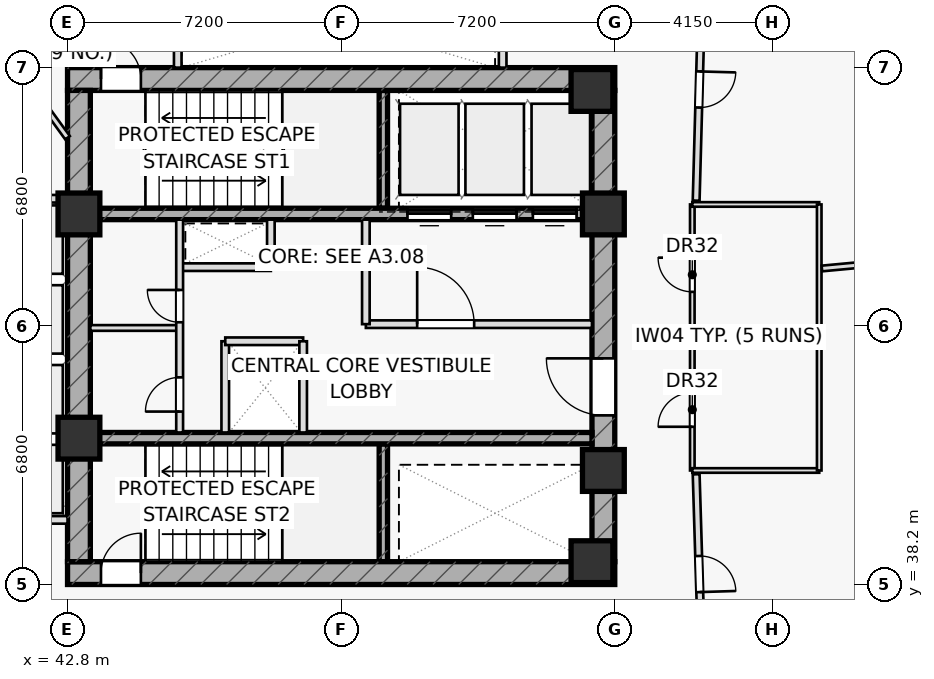
"""IFC4 building model, lengths in metres.
Left out: names, types, materials, properties, quantities, classifications, styles, units other than length and angle.
Written with IfcOpenShell. Run it as: python <this file> out.ifc"""

import sys

from ifc_helpers import new_model, si_unit, direction, frame, frame_2d, origin, origin_2d, place, context, subcontext, project, spatial, rectangle, extrude, element, fill, save


model = new_model("IFC4")
c1 = context("Model", 3, precision=1e-05, world=origin(), true_north=direction((0.0, 1.0)))
c2 = subcontext(c1, "Body", "Model", "MODEL_VIEW")
j1 = project(units=[si_unit("LENGTHUNIT", "METRE"), si_unit("PLANEANGLEUNIT", "RADIAN")], contexts=[c1])
p1 = place(None, origin())
s1 = spatial("IfcSite", under=j1, at=p1, CompositionType="ELEMENT")
p2 = place(p1, origin())
s2 = spatial("IfcBuilding", under=s1, at=p2, CompositionType="ELEMENT")
p3 = place(p2, frame((0.0, 0.0, 66.6)))
s3 = spatial("IfcBuildingStorey", under=s2, at=p3, CompositionType="ELEMENT", Elevation=66.6)
for number, where, z_axis, x_axis in (
    (1, (51.11, 48.1, 0.0), (0.0, 0.0, 1.0), (0.0, 1.0, 0.0)),
    (2, (51.11, 38.8, 0.0), (0.0, 0.0, 1.0), (0.0, 1.0, 0.0)),
):
    element("IfcWall", number, at=place(p3, frame(where, z_axis=z_axis, x_axis=x_axis)), inside=s3, PredefinedType="SHEAR", context=c2, shape_type="SweptSolid", body=[
        extrude(rectangle(XDim=3.1, YDim=0.22, at=frame_2d((1.55, 0.0))), origin(), (0.0, 0.0, 1.0), 3.6),
    ])
p4 = place(p3, frame((42.8, 51.5, 0.0), z_axis=(0.0, 0.0, 1.0), x_axis=(1.0, 0.0, 0.0)))
e3 = element("IfcWall", 3, at=p4, inside=s3, PredefinedType="SHEAR", context=c2, shape_type="SweptSolid", body=[
    extrude(rectangle(XDim=14.4, YDim=0.6, at=frame_2d((7.2, 0.0))), origin(), (0.0, 0.0, 1.0), 3.6),
])
p5 = place(p4, frame((0.88, 0.0, 0.0)))
e4 = element("IfcOpeningElement", 4, at=p5, cuts=e3, PredefinedType="OPENING", context=c2, shape_type="SweptSolid", body=[
    extrude(rectangle(XDim=1.05, YDim=2.2, at=frame_2d((0.525, 1.1))), frame((0.0, 0.31, 0.0), z_axis=(0.0, -1.0, 0.0), x_axis=(1.0, 0.0, 0.0)), (0.0, 0.0, 1.0), 0.62),
])
p6 = place(p3, frame((42.8, 38.5, 0.0), z_axis=(0.0, 0.0, 1.0), x_axis=(1.0, 0.0, 0.0)))
e5 = element("IfcWall", 5, at=p6, inside=s3, PredefinedType="SHEAR", context=c2, shape_type="SweptSolid", body=[
    extrude(rectangle(XDim=14.4, YDim=0.6, at=frame_2d((7.2, 0.0))), origin(), (0.0, 0.0, 1.0), 3.6),
])
p7 = place(p6, frame((0.88, 0.0, 0.0)))
e6 = element("IfcOpeningElement", 6, at=p7, cuts=e5, PredefinedType="OPENING", context=c2, shape_type="SweptSolid", body=[
    extrude(rectangle(XDim=1.05, YDim=2.2, at=frame_2d((0.525, 1.1))), frame((0.0, 0.31, 0.0), z_axis=(0.0, -1.0, 0.0), x_axis=(1.0, 0.0, 0.0)), (0.0, 0.0, 1.0), 0.62),
])
p8 = place(p3, frame((43.1, 38.8, 0.0), z_axis=(0.0, 0.0, 1.0), x_axis=(0.0, 1.0, 0.0)))
e7 = element("IfcWall", 7, at=p8, inside=s3, PredefinedType="SHEAR", context=c2, shape_type="SweptSolid", body=[
    extrude(rectangle(XDim=12.4, YDim=0.6, at=frame_2d((6.2, 0.0))), origin(), (0.0, 0.0, 1.0), 3.6),
])
p9 = place(p3, frame((56.9, 38.8, 0.0), z_axis=(0.0, 0.0, 1.0), x_axis=(0.0, 1.0, 0.0)))
e8 = element("IfcWall", 8, at=p9, inside=s3, PredefinedType="SHEAR", context=c2, shape_type="SweptSolid", body=[
    extrude(rectangle(XDim=12.4, YDim=0.6, at=frame_2d((6.2, 0.0))), origin(), (0.0, 0.0, 1.0), 3.6),
])
p10 = place(p9, frame((3.85, 0.0, 0.0)))
e9 = element("IfcOpeningElement", 9, at=p10, cuts=e8, PredefinedType="OPENING", context=c2, shape_type="SweptSolid", body=[
    extrude(rectangle(XDim=1.5, YDim=2.2, at=frame_2d((0.75, 1.1))), frame((0.0, 0.31, 0.0), z_axis=(0.0, -1.0, 0.0), x_axis=(1.0, 0.0, 0.0)), (0.0, 0.0, 1.0), 0.62),
])
p11 = place(p3, frame((43.4, 47.95, 0.0), z_axis=(0.0, 0.0, 1.0), x_axis=(1.0, 0.0, 0.0)))
e10 = element("IfcWall", 10, at=p11, inside=s3, PredefinedType="SHEAR", context=c2, shape_type="SweptSolid", body=[
    extrude(rectangle(XDim=13.2, YDim=0.3, at=frame_2d((6.6, 0.0))), origin(), (0.0, 0.0, 1.0), 3.6),
])
p12 = place(p11, frame((8.345, 0.0, 0.0)))
e11 = element("IfcOpeningElement", 11, at=p12, cuts=e10, PredefinedType="OPENING", context=c2, shape_type="SweptSolid", body=[
    extrude(rectangle(XDim=1.15, YDim=2.2, at=frame_2d((0.575, 1.1))), frame((0.0, 0.16, 0.0), z_axis=(0.0, -1.0, 0.0), x_axis=(1.0, 0.0, 0.0)), (0.0, 0.0, 1.0), 0.32),
])
p13 = place(p11, frame((10.065, 0.0, 0.0)))
e12 = element("IfcOpeningElement", 12, at=p13, cuts=e10, PredefinedType="OPENING", context=c2, shape_type="SweptSolid", body=[
    extrude(rectangle(XDim=1.15, YDim=2.2, at=frame_2d((0.575, 1.1))), frame((0.0, 0.16, 0.0), z_axis=(0.0, -1.0, 0.0), x_axis=(1.0, 0.0, 0.0)), (0.0, 0.0, 1.0), 0.32),
])
p14 = place(p11, frame((11.645, 0.0, 0.0)))
e13 = element("IfcOpeningElement", 13, at=p14, cuts=e10, PredefinedType="OPENING", context=c2, shape_type="SweptSolid", body=[
    extrude(rectangle(XDim=1.15, YDim=2.2, at=frame_2d((0.575, 1.1))), frame((0.0, 0.16, 0.0), z_axis=(0.0, -1.0, 0.0), x_axis=(1.0, 0.0, 0.0)), (0.0, 0.0, 1.0), 0.32),
])
p15 = place(p3, frame((43.4, 42.05, 0.0), z_axis=(0.0, 0.0, 1.0), x_axis=(1.0, 0.0, 0.0)))
e14 = element("IfcWall", 14, at=p15, inside=s3, PredefinedType="SHEAR", context=c2, shape_type="SweptSolid", body=[
    extrude(rectangle(XDim=13.2, YDim=0.3, at=frame_2d((6.6, 0.0))), origin(), (0.0, 0.0, 1.0), 3.6),
])
for number, where, z_axis, x_axis in (
    (15, (43.1, 47.95, 0.0), (0.0, 0.0, 1.0), (1.0, 0.0, 0.0)),
    (16, (56.9, 47.95, 0.0), (0.0, 0.0, 1.0), (1.0, 0.0, 0.0)),
    (17, (56.6, 51.2, 0.0), (0.0, 0.0, 1.0), (1.0, 0.0, 0.0)),
    (18, (43.1, 42.05, 0.0), (0.0, 0.0, 1.0), (1.0, 0.0, 0.0)),
    (19, (56.9, 41.2, 0.0), (0.0, 0.0, 1.0), (1.0, 0.0, 0.0)),
    (20, (56.6, 38.8, 0.0), (0.0, 0.0, 1.0), (1.0, 0.0, 0.0)),
):
    element("IfcColumn", number, at=place(p3, frame(where, z_axis=z_axis, x_axis=x_axis)), inside=s3, PredefinedType="COLUMN", context=c2, shape_type="SweptSolid", body=[
        extrude(rectangle(XDim=1.1, YDim=1.1, at=origin_2d()), origin(), (0.0, 0.0, 1.0), 3.6),
    ])
for number, where, z_axis, x_axis in (
    (21, (40.3, 39.9, 0.0), (0.0, 0.0, 1.0), (1.0, 0.0, 0.0)),
    (22, (40.3, 48.35, 0.0), (0.0, 0.0, 1.0), (1.0, 0.0, 0.0)),
    (23, (45.7, 51.8, 0.0), (0.0, 0.0, 1.0), (0.0, 1.0, 0.0)),
    (24, (54.25, 51.8, 0.0), (0.0, 0.0, 1.0), (0.0, 1.0, 0.0)),
):
    element("IfcWall", number, at=place(p3, frame(where, z_axis=z_axis, x_axis=x_axis)), inside=s3, PredefinedType="PARTITIONING", context=c2, shape_type="SweptSolid", body=[
        extrude(rectangle(XDim=2.5, YDim=0.2, at=frame_2d((1.25, 0.0))), origin(), (0.0, 0.0, 1.0), 3.6),
    ])
p16 = place(p3, frame((45.75, 46.55, 0.0), z_axis=(0.0, 0.0, 1.0), x_axis=(1.0, 0.0, 0.0)))
e25 = element("IfcWall", 25, at=p16, inside=s3, PredefinedType="PARTITIONING", context=c2, shape_type="SweptSolid", body=[
    extrude(rectangle(XDim=2.4, YDim=0.2, at=frame_2d((1.2, 0.0))), origin(), (0.0, 0.0, 1.0), 3.6),
])
p17 = place(p3, frame((48.15, 46.55, 0.0), z_axis=(0.0, 0.0, 1.0), x_axis=(0.0, 1.0, 0.0)))
e26 = element("IfcWall", 26, at=p17, inside=s3, PredefinedType="PARTITIONING", context=c2, shape_type="SweptSolid", body=[
    extrude(rectangle(XDim=1.25, YDim=0.2, at=frame_2d((0.625, 0.0))), origin(), (0.0, 0.0, 1.0), 3.6),
])
p18 = place(p3, frame((46.95, 42.2, 0.0), z_axis=(0.0, 0.0, 1.0), x_axis=(0.0, 1.0, 0.0)))
e27 = element("IfcWall", 27, at=p18, inside=s3, PredefinedType="PARTITIONING", context=c2, shape_type="SweptSolid", body=[
    extrude(rectangle(XDim=2.4, YDim=0.2, at=frame_2d((1.2, 0.0))), origin(), (0.0, 0.0, 1.0), 3.6),
])
p19 = place(p3, frame((46.95, 44.6, 0.0), z_axis=(0.0, 0.0, 1.0), x_axis=(1.0, 0.0, 0.0)))
e28 = element("IfcWall", 28, at=p19, inside=s3, PredefinedType="PARTITIONING", context=c2, shape_type="SweptSolid", body=[
    extrude(rectangle(XDim=2.05, YDim=0.2, at=frame_2d((1.025, 0.0))), origin(), (0.0, 0.0, 1.0), 3.6),
])
p20 = place(p3, frame((50.65, 45.05, 0.0), z_axis=(0.0, 0.0, 1.0), x_axis=(1.0, 0.0, 0.0)))
e29 = element("IfcWall", 29, at=p20, inside=s3, PredefinedType="PARTITIONING", context=c2, shape_type="SweptSolid", body=[
    extrude(rectangle(XDim=5.95, YDim=0.2, at=frame_2d((2.975, 0.0))), origin(), (0.0, 0.0, 1.0), 3.6),
])
p21 = place(p20, frame((1.35, 0.0, 0.0)))
e30 = element("IfcOpeningElement", 30, at=p21, cuts=e29, PredefinedType="OPENING", context=c2, shape_type="SweptSolid", body=[
    extrude(rectangle(XDim=1.5, YDim=2.2, at=frame_2d((0.75, 1.1))), frame((0.0, 0.11, 0.0), z_axis=(0.0, -1.0, 0.0), x_axis=(1.0, 0.0, 0.0)), (0.0, 0.0, 1.0), 0.22),
])
p22 = place(p3, frame((50.65, 45.05, 0.0), z_axis=(0.0, 0.0, 1.0), x_axis=(0.0, 1.0, 0.0)))
e31 = element("IfcWall", 31, at=p22, inside=s3, PredefinedType="PARTITIONING", context=c2, shape_type="SweptSolid", body=[
    extrude(rectangle(XDim=2.75, YDim=0.2, at=frame_2d((1.375, 0.0))), origin(), (0.0, 0.0, 1.0), 3.6),
])
p23 = place(p3, frame((43.4, 44.95, 0.0), z_axis=(0.0, 0.0, 1.0), x_axis=(1.0, 0.0, 0.0)))
e32 = element("IfcWall", 32, at=p23, inside=s3, PredefinedType="PARTITIONING", context=c2, shape_type="SweptSolid", body=[
    extrude(rectangle(XDim=2.35, YDim=0.15, at=frame_2d((1.175, 0.0))), origin(), (0.0, 0.0, 1.0), 3.6),
])
p24 = place(p3, frame((45.75, 42.2, 0.0), z_axis=(0.0, 0.0, 1.0), x_axis=(0.0, 1.0, 0.0)))
e33 = element("IfcWall", 33, at=p24, inside=s3, PredefinedType="PARTITIONING", context=c2, shape_type="SweptSolid", body=[
    extrude(rectangle(XDim=5.6, YDim=0.18, at=frame_2d((2.8, 0.0))), origin(), (0.0, 0.0, 1.0), 3.6),
])
p25 = place(p24, frame((0.55, 0.0, 0.0)))
e34 = element("IfcOpeningElement", 34, at=p25, cuts=e33, PredefinedType="OPENING", context=c2, shape_type="SweptSolid", body=[
    extrude(rectangle(XDim=0.9, YDim=2.05, at=frame_2d((0.45, 1.025))), frame((0.0, 0.1, 0.0), z_axis=(0.0, -1.0, 0.0), x_axis=(1.0, 0.0, 0.0)), (0.0, 0.0, 1.0), 0.2),
])
p26 = place(p24, frame((2.9, 0.0, 0.0)))
e35 = element("IfcOpeningElement", 35, at=p26, cuts=e33, PredefinedType="OPENING", context=c2, shape_type="SweptSolid", body=[
    extrude(rectangle(XDim=0.85, YDim=2.05, at=frame_2d((0.425, 1.025))), frame((0.0, 0.1, 0.0), z_axis=(0.0, -1.0, 0.0), x_axis=(1.0, 0.0, 0.0)), (0.0, 0.0, 1.0), 0.2),
])
p27 = place(p3, frame((59.24, 41.2, 0.0), z_axis=(0.0, 0.0, 1.0), x_axis=(0.0, 1.0, 0.0)))
e36 = element("IfcWall", 36, at=p27, inside=s3, PredefinedType="PARTITIONING", context=c2, shape_type="SweptSolid", body=[
    extrude(rectangle(XDim=7.0, YDim=0.12, at=frame_2d((3.5, 0.0))), origin(), (0.0, 0.0, 1.0), 3.6),
])
p28 = place(p27, frame((1.15, 0.0, 0.0)))
e37 = element("IfcOpeningElement", 37, at=p28, cuts=e36, PredefinedType="OPENING", context=c2, shape_type="SweptSolid", body=[
    extrude(rectangle(XDim=0.9, YDim=2.05, at=frame_2d((0.45, 1.025))), frame((0.0, 0.07, 0.0), z_axis=(0.0, -1.0, 0.0), x_axis=(1.0, 0.0, 0.0)), (0.0, 0.0, 1.0), 0.14),
])
p29 = place(p27, frame((4.7, 0.0, 0.0)))
e38 = element("IfcOpeningElement", 38, at=p29, cuts=e36, PredefinedType="OPENING", context=c2, shape_type="SweptSolid", body=[
    extrude(rectangle(XDim=0.9, YDim=2.05, at=frame_2d((0.45, 1.025))), frame((0.0, 0.07, 0.0), z_axis=(0.0, -1.0, 0.0), x_axis=(1.0, 0.0, 0.0)), (0.0, 0.0, 1.0), 0.14),
])
p30 = place(p3, frame((59.24, 41.2, 0.0), z_axis=(0.0, 0.0, 1.0), x_axis=(1.0, 0.0, 0.0)))
e39 = element("IfcWall", 39, at=p30, inside=s3, PredefinedType="PARTITIONING", context=c2, shape_type="SweptSolid", body=[
    extrude(rectangle(XDim=3.34, YDim=0.12, at=frame_2d((1.67, 0.0))), origin(), (0.0, 0.0, 1.0), 2.975),
])
for number, where, z_axis, x_axis in (
    (40, (59.24, 44.65, 0.0), (0.0, 0.0, 1.0), (1.0, 0.0, 0.0)),
    (41, (59.24, 48.2, 0.0), (0.0, 0.0, 1.0), (1.0, 0.0, 0.0)),
):
    element("IfcWall", number, at=place(p3, frame(where, z_axis=z_axis, x_axis=x_axis)), inside=s3, PredefinedType="PARTITIONING", context=c2, shape_type="SweptSolid", body=[
        extrude(rectangle(XDim=3.34, YDim=0.12, at=frame_2d((1.67, 0.0))), origin(), (0.0, 0.0, 1.0), 3.6),
    ])
p31 = place(p3, frame((62.58, 41.2, 0.0), z_axis=(0.0, 0.0, 1.0), x_axis=(0.0, 1.0, 0.0)))
e42 = element("IfcWall", 42, at=p31, inside=s3, PredefinedType="PARTITIONING", context=c2, shape_type="SweptSolid", body=[
    extrude(rectangle(XDim=7.0, YDim=0.12, at=frame_2d((3.5, 0.0))), origin(), (0.0, 0.0, 1.0), 3.6),
])
p32 = place(p3, frame((42.8, 49.955, 0.0), z_axis=(0.0, 0.0, 1.0), x_axis=(-0.587794647475, 0.809010168292, 0.0)))
e43 = element("IfcWall", 43, at=p32, inside=s3, PredefinedType="PARTITIONING", context=c2, shape_type="SweptSolid", body=[
    extrude(rectangle(XDim=20.1, YDim=0.15, at=frame_2d((10.05, 0.0))), origin(), (0.0, 0.0, 1.0), 2.975),
])
p33 = place(p32, frame((1.35, 0.0, 0.0)))
e44 = element("IfcOpeningElement", 44, at=p33, cuts=e43, PredefinedType="OPENING", context=c2, shape_type="SweptSolid", body=[
    extrude(rectangle(XDim=0.95, YDim=2.05, at=frame_2d((0.475, 1.025))), frame((0.0, 0.085, 0.0), z_axis=(0.0, -1.0, 0.0), x_axis=(1.0, 0.0, 0.0)), (0.0, 0.0, 1.0), 0.17),
])
p34 = place(p3, frame((62.65, 46.515, 0.0), z_axis=(0.0, 0.0, 1.0), x_axis=(0.995684565506, 0.092802187545, 0.0)))
e45 = element("IfcWall", 45, at=p34, inside=s3, PredefinedType="PARTITIONING", context=c2, shape_type="SweptSolid", body=[
    extrude(rectangle(XDim=10.042, YDim=0.15, at=frame_2d((5.021, 0.0))), origin(), (0.0, 0.0, 1.0), 3.025),
])
p35 = place(p3, frame((59.501, 54.15, 0.0), z_axis=(0.0, 0.0, 1.0), x_axis=(-0.027367567602, -0.999625437973, 0.0)))
e46 = element("IfcWall", 46, at=p35, inside=s3, PredefinedType="PARTITIONING", context=c2, shape_type="SweptSolid", body=[
    extrude(rectangle(XDim=5.852, YDim=0.18, at=frame_2d((2.926, 0.0))), origin(), (0.0, 0.0, 1.0), 2.975),
])
p36 = place(p35, frame((2.451, 0.0, 0.0)))
e47 = element("IfcOpeningElement", 47, at=p36, cuts=e46, PredefinedType="OPENING", context=c2, shape_type="SweptSolid", body=[
    extrude(rectangle(XDim=0.95, YDim=2.05, at=frame_2d((0.475, 1.025))), frame((0.0, 0.1, 0.0), z_axis=(0.0, -1.0, 0.0), x_axis=(1.0, 0.0, 0.0)), (0.0, 0.0, 1.0), 0.2),
])
p37 = place(p3, frame((59.342, 41.1, 0.0), z_axis=(0.0, 0.0, 1.0), x_axis=(0.030445329425, -0.999536433511, 0.0)))
e48 = element("IfcWall", 48, at=p37, inside=s3, PredefinedType="PARTITIONING", context=c2, shape_type="SweptSolid", body=[
    extrude(rectangle(XDim=5.252, YDim=0.18, at=frame_2d((2.626, 0.0))), origin(), (0.0, 0.0, 1.0), 2.975),
])
p38 = place(p37, frame((2.151, 0.0, 0.0)))
e49 = element("IfcOpeningElement", 49, at=p38, cuts=e48, PredefinedType="OPENING", context=c2, shape_type="SweptSolid", body=[
    extrude(rectangle(XDim=0.95, YDim=2.05, at=frame_2d((0.475, 1.025))), frame((0.0, 0.1, 0.0), z_axis=(0.0, -1.0, 0.0), x_axis=(1.0, 0.0, 0.0)), (0.0, 0.0, 1.0), 0.2),
])
p39 = place(p3, frame((49.0, 42.2, 0.0), z_axis=(0.0, 0.0, 1.0), x_axis=(0.0, 1.0, 0.0)))
e50 = element("IfcWall", 50, at=p39, inside=s3, PredefinedType="PARTITIONING", context=c2, shape_type="SweptSolid", body=[
    extrude(rectangle(XDim=2.4, YDim=0.2, at=frame_2d((1.2, 0.0))), origin(), (0.0, 0.0, 1.0), 3.6),
])
p40 = place(p5, origin())
e51 = element("IfcDoor", 51, at=p40, inside=s3, OperationType="SINGLE_SWING_LEFT", PredefinedType="DOOR", context=c2, shape_type="SweptSolid", body=[
    extrude(rectangle(XDim=1.05, YDim=2.2, at=frame_2d((0.525, 1.1))), frame((0.0, 0.025, 0.0), z_axis=(0.0, -1.0, 0.0), x_axis=(1.0, 0.0, 0.0)), (0.0, 0.0, 1.0), 0.05),
])
fill(e4, e51)
p41 = place(p7, origin())
e52 = element("IfcDoor", 52, at=p41, inside=s3, OperationType="SINGLE_SWING_RIGHT", PredefinedType="DOOR", context=c2, shape_type="SweptSolid", body=[
    extrude(rectangle(XDim=1.05, YDim=2.2, at=frame_2d((0.525, 1.1))), frame((0.0, 0.025, 0.0), z_axis=(0.0, -1.0, 0.0), x_axis=(1.0, 0.0, 0.0)), (0.0, 0.0, 1.0), 0.05),
])
fill(e6, e52)
p42 = place(p10, origin())
e53 = element("IfcDoor", 53, at=p42, inside=s3, OperationType="SINGLE_SWING_RIGHT", PredefinedType="DOOR", context=c2, shape_type="SweptSolid", body=[
    extrude(rectangle(XDim=1.5, YDim=2.2, at=frame_2d((0.75, 1.1))), frame((0.0, 0.025, 0.0), z_axis=(0.0, -1.0, 0.0), x_axis=(1.0, 0.0, 0.0)), (0.0, 0.0, 1.0), 0.05),
])
fill(e9, e53)
p43 = place(p21, origin())
e54 = element("IfcDoor", 54, at=p43, inside=s3, OperationType="SINGLE_SWING_LEFT", PredefinedType="DOOR", context=c2, shape_type="SweptSolid", body=[
    extrude(rectangle(XDim=1.5, YDim=2.2, at=frame_2d((0.75, 1.1))), frame((0.0, 0.025, 0.0), z_axis=(0.0, -1.0, 0.0), x_axis=(1.0, 0.0, 0.0)), (0.0, 0.0, 1.0), 0.05),
])
fill(e30, e54)
p44 = place(p25, origin())
e55 = element("IfcDoor", 55, at=p44, inside=s3, OperationType="SINGLE_SWING_LEFT", PredefinedType="DOOR", context=c2, shape_type="SweptSolid", body=[
    extrude(rectangle(XDim=0.9, YDim=2.05, at=frame_2d((0.45, 1.025))), frame((0.0, 0.025, 0.0), z_axis=(0.0, -1.0, 0.0), x_axis=(1.0, 0.0, 0.0)), (0.0, 0.0, 1.0), 0.05),
])
fill(e34, e55)
p45 = place(p26, origin())
e56 = element("IfcDoor", 56, at=p45, inside=s3, OperationType="SINGLE_SWING_RIGHT", PredefinedType="DOOR", context=c2, shape_type="SweptSolid", body=[
    extrude(rectangle(XDim=0.85, YDim=2.05, at=frame_2d((0.425, 1.025))), frame((0.0, 0.025, 0.0), z_axis=(0.0, -1.0, 0.0), x_axis=(1.0, 0.0, 0.0)), (0.0, 0.0, 1.0), 0.05),
])
fill(e35, e56)
p46 = place(p28, origin())
e57 = element("IfcDoor", 57, at=p46, inside=s3, OperationType="SINGLE_SWING_LEFT", PredefinedType="DOOR", context=c2, shape_type="SweptSolid", body=[
    extrude(rectangle(XDim=0.9, YDim=2.05, at=frame_2d((0.45, 1.025))), frame((0.0, 0.025, 0.0), z_axis=(0.0, -1.0, 0.0), x_axis=(1.0, 0.0, 0.0)), (0.0, 0.0, 1.0), 0.05),
])
fill(e37, e57)
p47 = place(p29, origin())
e58 = element("IfcDoor", 58, at=p47, inside=s3, OperationType="SINGLE_SWING_RIGHT", PredefinedType="DOOR", context=c2, shape_type="SweptSolid", body=[
    extrude(rectangle(XDim=0.9, YDim=2.05, at=frame_2d((0.45, 1.025))), frame((0.0, 0.025, 0.0), z_axis=(0.0, -1.0, 0.0), x_axis=(1.0, 0.0, 0.0)), (0.0, 0.0, 1.0), 0.05),
])
fill(e38, e58)
p48 = place(p36, origin())
e59 = element("IfcDoor", 59, at=p48, inside=s3, OperationType="SINGLE_SWING_LEFT", PredefinedType="DOOR", context=c2, shape_type="SweptSolid", body=[
    extrude(rectangle(XDim=0.95, YDim=2.05, at=frame_2d((0.475, 1.025))), frame((0.0, 0.025, 0.0), z_axis=(0.0, -1.0, 0.0), x_axis=(1.0, 0.0, 0.0)), (0.0, 0.0, 1.0), 0.05),
])
fill(e47, e59)
p49 = place(p38, origin())
e60 = element("IfcDoor", 60, at=p49, inside=s3, OperationType="SINGLE_SWING_RIGHT", PredefinedType="DOOR", context=c2, shape_type="SweptSolid", body=[
    extrude(rectangle(XDim=0.95, YDim=2.05, at=frame_2d((0.475, 1.025))), frame((0.0, 0.025, 0.0), z_axis=(0.0, -1.0, 0.0), x_axis=(1.0, 0.0, 0.0)), (0.0, 0.0, 1.0), 0.05),
])
fill(e49, e60)
p50 = place(p12, origin())
e61 = element("IfcDoor", 61, at=p50, inside=s3, OperationType="SLIDING_TO_LEFT", PredefinedType="DOOR", context=c2, shape_type="SweptSolid", body=[
    extrude(rectangle(XDim=1.15, YDim=2.2, at=frame_2d((0.575, 1.1))), frame((0.0, 0.025, 0.0), z_axis=(0.0, -1.0, 0.0), x_axis=(1.0, 0.0, 0.0)), (0.0, 0.0, 1.0), 0.05),
])
fill(e11, e61)
p51 = place(p13, origin())
e62 = element("IfcDoor", 62, at=p51, inside=s3, OperationType="SLIDING_TO_LEFT", PredefinedType="DOOR", context=c2, shape_type="SweptSolid", body=[
    extrude(rectangle(XDim=1.15, YDim=2.2, at=frame_2d((0.575, 1.1))), frame((0.0, 0.025, 0.0), z_axis=(0.0, -1.0, 0.0), x_axis=(1.0, 0.0, 0.0)), (0.0, 0.0, 1.0), 0.05),
])
fill(e12, e62)
p52 = place(p14, origin())
e63 = element("IfcDoor", 63, at=p52, inside=s3, OperationType="SLIDING_TO_LEFT", PredefinedType="DOOR", context=c2, shape_type="SweptSolid", body=[
    extrude(rectangle(XDim=1.15, YDim=2.2, at=frame_2d((0.575, 1.1))), frame((0.0, 0.025, 0.0), z_axis=(0.0, -1.0, 0.0), x_axis=(1.0, 0.0, 0.0)), (0.0, 0.0, 1.0), 0.05),
])
fill(e13, e63)
save(model, sys.argv[1])
